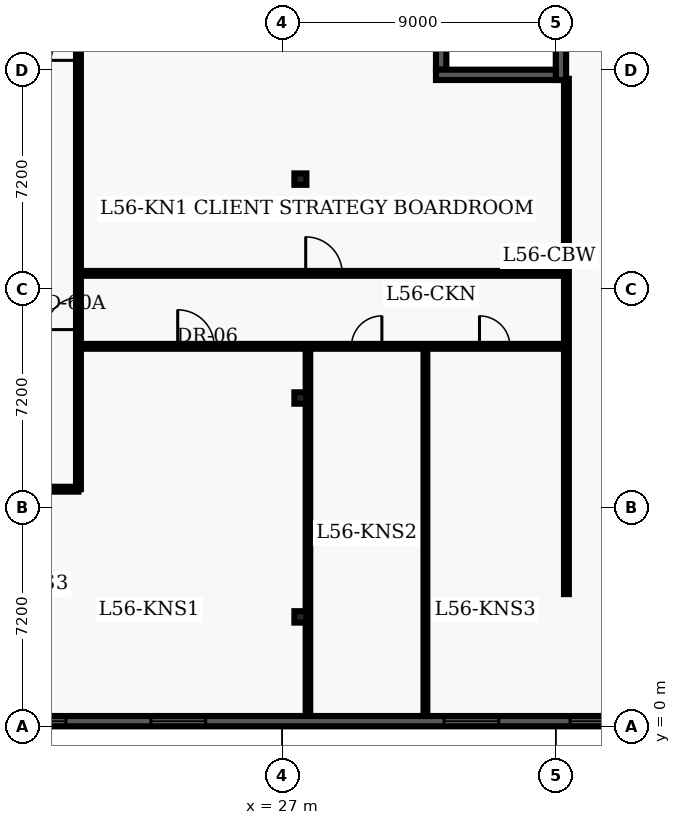
"""IFC4 building model, lengths in metres.
Left out: names, types, materials, properties, quantities, classifications, styles, units other than length and angle.
Written with IfcOpenShell. Run it as: python <this file> out.ifc"""

import sys

from ifc_helpers import new_model, entity, si_unit, converted_unit, direction, frame, origin_with_axes, origin_2d_with_axis, place, context, subcontext, project, spatial, polyline, rectangle, i_section, outline, extrude, element, fill, save


model = new_model("IFC4")
c1 = context("Model", 3, precision=1e-05, world=origin_with_axes(), true_north=direction((0.0, 1.0)))
c2 = subcontext(c1, "Body", "Model", "MODEL_VIEW")
j1 = project(units=[si_unit("LENGTHUNIT", "METRE"), converted_unit("PLANEANGLEUNIT", "DEGREE", entity("IfcPlaneAngleMeasure", 0.017), si_unit("PLANEANGLEUNIT", "RADIAN"), dimensions=[0, 0, 0, 0, 0, 0, 0])], contexts=[c1])
p1 = place(None, origin_with_axes())
s1 = spatial("IfcSite", under=j1, at=p1, CompositionType="ELEMENT")
p2 = place(p1, origin_with_axes())
s2 = spatial("IfcBuilding", under=s1, at=p2, CompositionType="ELEMENT")
p3 = place(p2, frame((0.0, 0.0, 228.6), z_axis=(0.0, 0.0, 1.0), x_axis=(1.0, 0.0, 0.0)))
s3 = spatial("IfcBuildingStorey", under=s2, at=p3, CompositionType="ELEMENT", Elevation=228.6)
for number, where, z_axis, x_axis in (
    (1, (27.6, 3.6, 0.0), (0.0, 0.0, 1.0), (1.0, 0.0, 0.0)),
    (2, (27.6, 10.8, 0.0), (0.0, 0.0, 1.0), (1.0, 0.0, 0.0)),
    (3, (27.6, 18.0, 0.0), (0.0, 0.0, 1.0), (1.0, 0.0, 0.0)),
):
    element("IfcColumn", number, at=place(p3, frame(where, z_axis=z_axis, x_axis=x_axis)), inside=s3, PredefinedType="COLUMN", context=c2, shape_type="SweptSolid", body=[
        extrude(i_section(OverallWidth=0.394, OverallDepth=0.375, WebThickness=0.017, FlangeThickness=0.028, FilletRadius=0.02, at=origin_2d_with_axis()), origin_with_axes(), (0.0, 0.0, 1.0), 3.9),
    ])
p4 = place(p3, frame((7.1, 7.8, 0.0), z_axis=(0.0, 0.0, 1.0), x_axis=(1.0, 0.0, 0.0)))
e4 = element("IfcWall", 4, at=p4, inside=s3, PredefinedType="PARTITIONING", context=c2, shape_type="SweptSolid", body=[
    extrude(outline(polyline([(0.0, -0.08), (13.2, -0.08), (13.2, 0.08), (0.0, 0.08), (0.0, -0.08)])), origin_with_axes(), (0.0, 0.0, 1.0), 2.7),
])
p5 = place(p4, frame((2.929, 0.0, 0.0), z_axis=(0.0, 0.0, 1.0), x_axis=(1.0, 0.0, 0.0)))
e5 = element("IfcOpeningElement", 5, at=p5, cuts=e4, PredefinedType="OPENING", context=c2, shape_type="SweptSolid", body=[
    extrude(rectangle(XDim=1.0, YDim=0.18, at=origin_2d_with_axis()), origin_with_axes(), (0.0, 0.0, 1.0), 2.15),
])
p6 = place(p4, frame((7.56, 0.0, 0.0), z_axis=(0.0, 0.0, 1.0), x_axis=(1.0, 0.0, 0.0)))
e6 = element("IfcOpeningElement", 6, at=p6, cuts=e4, PredefinedType="OPENING", context=c2, shape_type="SweptSolid", body=[
    extrude(rectangle(XDim=1.0, YDim=0.18, at=origin_2d_with_axis()), origin_with_axes(), (0.0, 0.0, 1.0), 2.15),
])
p7 = place(p4, frame((11.201, 0.0, 0.0), z_axis=(0.0, 0.0, 1.0), x_axis=(1.0, 0.0, 0.0)))
e7 = element("IfcOpeningElement", 7, at=p7, cuts=e4, PredefinedType="OPENING", context=c2, shape_type="SweptSolid", body=[
    extrude(rectangle(XDim=1.0, YDim=0.18, at=origin_2d_with_axis()), origin_with_axes(), (0.0, 0.0, 1.0), 2.15),
])
p8 = place(p3, frame((20.3, 7.8, 0.0), z_axis=(0.0, 0.0, 1.0), x_axis=(0.0, 1.0, 0.0)))
e8 = element("IfcWall", 8, at=p8, inside=s3, PredefinedType="PARTITIONING", context=c2, shape_type="SweptSolid", body=[
    extrude(outline(polyline([(0.0, -0.08), (32.7, -0.08), (32.7, 0.08), (0.0, 0.08), (0.0, -0.08)])), origin_with_axes(), (0.0, 0.0, 1.0), 2.7),
])
p9 = place(p8, frame((14.556, 0.0, 0.0), z_axis=(0.0, 0.0, 1.0), x_axis=(1.0, 0.0, 0.0)))
e9 = element("IfcOpeningElement", 9, at=p9, cuts=e8, PredefinedType="OPENING", context=c2, shape_type="SweptSolid", body=[
    extrude(rectangle(XDim=0.9, YDim=0.18, at=origin_2d_with_axis()), origin_with_axes(), (0.0, 0.0, 1.0), 2.15),
])
p10 = place(p8, frame((18.551, 0.0, 0.0), z_axis=(0.0, 0.0, 1.0), x_axis=(1.0, 0.0, 0.0)))
e10 = element("IfcOpeningElement", 10, at=p10, cuts=e8, PredefinedType="OPENING", context=c2, shape_type="SweptSolid", body=[
    extrude(rectangle(XDim=1.0, YDim=0.18, at=origin_2d_with_axis()), origin_with_axes(), (0.0, 0.0, 1.0), 2.15),
])
p11 = place(p8, frame((22.226, 0.0, 0.0), z_axis=(0.0, 0.0, 1.0), x_axis=(1.0, 0.0, 0.0)))
e11 = element("IfcOpeningElement", 11, at=p11, cuts=e8, PredefinedType="OPENING", context=c2, shape_type="SweptSolid", body=[
    extrude(rectangle(XDim=1.0, YDim=0.18, at=origin_2d_with_axis()), origin_with_axes(), (0.0, 0.0, 1.0), 2.15),
])
p12 = place(p8, frame((25.754, 0.0, 0.0), z_axis=(0.0, 0.0, 1.0), x_axis=(1.0, 0.0, 0.0)))
e12 = element("IfcOpeningElement", 12, at=p12, cuts=e8, PredefinedType="OPENING", context=c2, shape_type="SweptSolid", body=[
    extrude(rectangle(XDim=1.0, YDim=0.18, at=origin_2d_with_axis()), origin_with_axes(), (0.0, 0.0, 1.0), 2.15),
])
p13 = place(p8, frame((5.775, 0.0, 0.0), z_axis=(0.0, 0.0, 1.0), x_axis=(1.0, 0.0, 0.0)))
e13 = element("IfcOpeningElement", 13, at=p13, cuts=e8, PredefinedType="OPENING", context=c2, shape_type="SweptSolid", body=[
    extrude(rectangle(XDim=1.05, YDim=0.18, at=origin_2d_with_axis()), origin_with_axes(), (0.0, 0.0, 1.0), 2.15),
])
p14 = place(p3, frame((20.3, 12.5, 0.0), z_axis=(0.0, 0.0, 1.0), x_axis=(1.0, 0.0, 0.0)))
e14 = element("IfcWall", 14, at=p14, inside=s3, PredefinedType="PARTITIONING", context=c2, shape_type="SweptSolid", body=[
    extrude(outline(polyline([(0.0, -0.08), (16.05, -0.08), (16.05, 0.08), (0.0, 0.08), (0.0, -0.08)])), origin_with_axes(), (0.0, 0.0, 1.0), 2.7),
])
p15 = place(p14, frame((3.865, 0.0, 0.0), z_axis=(0.0, 0.0, 1.0), x_axis=(1.0, 0.0, 0.0)))
e15 = element("IfcOpeningElement", 15, at=p15, cuts=e14, PredefinedType="OPENING", context=c2, shape_type="SweptSolid", body=[
    extrude(rectangle(XDim=1.2, YDim=0.18, at=origin_2d_with_axis()), origin_with_axes(), (0.0, 0.0, 1.0), 2.2),
])
p16 = place(p14, frame((9.48, 0.0, 0.0), z_axis=(0.0, 0.0, 1.0), x_axis=(1.0, 0.0, 0.0)))
e16 = element("IfcOpeningElement", 16, at=p16, cuts=e14, PredefinedType="OPENING", context=c2, shape_type="SweptSolid", body=[
    extrude(rectangle(XDim=1.0, YDim=0.18, at=origin_2d_with_axis()), origin_with_axes(), (0.0, 0.0, 1.0), 2.15),
])
p17 = place(p14, frame((13.691, 0.0, 0.0), z_axis=(0.0, 0.0, 1.0), x_axis=(1.0, 0.0, 0.0)))
e17 = element("IfcOpeningElement", 17, at=p17, cuts=e14, PredefinedType="OPENING", context=c2, shape_type="SweptSolid", body=[
    extrude(rectangle(XDim=1.0, YDim=0.18, at=origin_2d_with_axis()), origin_with_axes(), (0.0, 0.0, 1.0), 2.15),
])
p18 = place(p3, frame((20.3, 14.9, 0.0), z_axis=(0.0, 0.0, 1.0), x_axis=(1.0, 0.0, 0.0)))
e18 = element("IfcWall", 18, at=p18, inside=s3, PredefinedType="PARTITIONING", context=c2, shape_type="SweptSolid", body=[
    extrude(outline(polyline([(0.0, -0.08), (16.05, -0.08), (16.05, 0.08), (0.0, 0.08), (0.0, -0.08)])), origin_with_axes(), (0.0, 0.0, 1.0), 2.7),
])
p19 = place(p18, frame((8.075, 0.0, 0.0), z_axis=(0.0, 0.0, 1.0), x_axis=(1.0, 0.0, 0.0)))
e19 = element("IfcOpeningElement", 19, at=p19, cuts=e18, PredefinedType="OPENING", context=c2, shape_type="SweptSolid", body=[
    extrude(rectangle(XDim=1.2, YDim=0.18, at=origin_2d_with_axis()), origin_with_axes(), (0.0, 0.0, 1.0), 2.2),
])
p20 = place(p3, frame((36.35, 4.35, 0.0), z_axis=(0.0, 0.0, 1.0), x_axis=(0.0, 1.0, 0.0)))
e20 = element("IfcWall", 20, at=p20, inside=s3, PredefinedType="PARTITIONING", context=c2, shape_type="SweptSolid", body=[
    extrude(outline(polyline([(0.0, -0.08), (16.95, -0.08), (16.95, 0.08), (0.0, 0.08), (0.0, -0.08)])), origin_with_axes(), (0.0, 0.0, 1.0), 2.7),
])
p21 = place(p3, frame((27.849, 0.335, 0.0), z_axis=(0.0, 0.0, 1.0), x_axis=(0.0, 1.0, 0.0)))
e21 = element("IfcWall", 21, at=p21, inside=s3, PredefinedType="PARTITIONING", context=c2, shape_type="SweptSolid", body=[
    extrude(outline(polyline([(0.0, -0.075), (12.045, -0.075), (12.045, 0.075), (0.0, 0.075), (0.0, -0.075)])), origin_with_axes(), (0.0, 0.0, 1.0), 2.7),
])
p22 = place(p3, frame((31.712, 0.335, 0.0), z_axis=(0.0, 0.0, 1.0), x_axis=(0.0, 1.0, 0.0)))
e22 = element("IfcWall", 22, at=p22, inside=s3, PredefinedType="PARTITIONING", context=c2, shape_type="SweptSolid", body=[
    extrude(outline(polyline([(0.0, -0.062), (12.045, -0.062), (12.045, 0.062), (0.0, 0.062), (0.0, -0.062)])), origin_with_axes(), (0.0, 0.0, 1.0), 2.7),
])
p23 = place(p3, frame((36.17, 21.26, 0.0), z_axis=(0.0, 0.0, 1.0), x_axis=(0.0, 1.0, 0.0)))
e23 = element("IfcWall", 23, at=p23, inside=s3, PredefinedType="SOLIDWALL", context=c2, shape_type="SweptSolid", body=[
    extrude(outline(polyline([(0.0, -0.17), (7.54, -0.17), (7.54, 0.17), (0.0, 0.17), (0.0, -0.17)])), origin_with_axes(), (0.0, 0.0, 1.0), 3.66),
])
p24 = place(p23, frame((3.77, 0.0, 0.45), z_axis=(0.0, 0.0, 1.0), x_axis=(1.0, 0.0, 0.0)))
e24 = element("IfcOpeningElement", 24, at=p24, cuts=e23, PredefinedType="OPENING", context=c2, shape_type="SweptSolid", body=[
    extrude(rectangle(XDim=1.8, YDim=0.36, at=origin_2d_with_axis()), origin_with_axes(), (0.0, 0.0, 1.0), 2.1),
])
p25 = place(p3, frame((49.46, 0.17, 0.0), z_axis=(0.0, 0.0, 1.0), x_axis=(-1.0, 0.0, 0.0)))
e25 = element("IfcWall", 25, at=p25, inside=s3, PredefinedType="SOLIDWALL", context=c2, shape_type="SweptSolid", body=[
    extrude(outline(polyline([(0.0, -0.17), (42.56, -0.17), (42.56, 0.17), (0.0, 0.17), (0.0, -0.17)])), origin_with_axes(), (0.0, 0.0, 1.0), 3.66),
])
p26 = place(p25, frame((2.898, 0.0, 0.45), z_axis=(0.0, 0.0, 1.0), x_axis=(1.0, 0.0, 0.0)))
e26 = element("IfcOpeningElement", 26, at=p26, cuts=e25, PredefinedType="OPENING", context=c2, shape_type="SweptSolid", body=[
    extrude(rectangle(XDim=1.8, YDim=0.36, at=origin_2d_with_axis()), origin_with_axes(), (0.0, 0.0, 1.0), 2.1),
])
p27 = place(p25, frame((7.493, 0.0, 0.45), z_axis=(0.0, 0.0, 1.0), x_axis=(1.0, 0.0, 0.0)))
e27 = element("IfcOpeningElement", 27, at=p27, cuts=e25, PredefinedType="OPENING", context=c2, shape_type="SweptSolid", body=[
    extrude(rectangle(XDim=1.8, YDim=0.36, at=origin_2d_with_axis()), origin_with_axes(), (0.0, 0.0, 1.0), 2.1),
])
p28 = place(p25, frame((12.089, 0.0, 0.45), z_axis=(0.0, 0.0, 1.0), x_axis=(1.0, 0.0, 0.0)))
e28 = element("IfcOpeningElement", 28, at=p28, cuts=e25, PredefinedType="OPENING", context=c2, shape_type="SweptSolid", body=[
    extrude(rectangle(XDim=1.8, YDim=0.36, at=origin_2d_with_axis()), origin_with_axes(), (0.0, 0.0, 1.0), 2.1),
])
p29 = place(p25, frame((16.234, 0.0, 0.45), z_axis=(0.0, 0.0, 1.0), x_axis=(1.0, 0.0, 0.0)))
e29 = element("IfcOpeningElement", 29, at=p29, cuts=e25, PredefinedType="OPENING", context=c2, shape_type="SweptSolid", body=[
    extrude(rectangle(XDim=1.8, YDim=0.36, at=origin_2d_with_axis()), origin_with_axes(), (0.0, 0.0, 1.0), 2.1),
])
p30 = place(p25, frame((25.876, 0.0, 0.45), z_axis=(0.0, 0.0, 1.0), x_axis=(1.0, 0.0, 0.0)))
e30 = element("IfcOpeningElement", 30, at=p30, cuts=e25, PredefinedType="OPENING", context=c2, shape_type="SweptSolid", body=[
    extrude(rectangle(XDim=1.8, YDim=0.36, at=origin_2d_with_axis()), origin_with_axes(), (0.0, 0.0, 1.0), 2.1),
])
p31 = place(p25, frame((30.471, 0.0, 0.45), z_axis=(0.0, 0.0, 1.0), x_axis=(1.0, 0.0, 0.0)))
e31 = element("IfcOpeningElement", 31, at=p31, cuts=e25, PredefinedType="OPENING", context=c2, shape_type="SweptSolid", body=[
    extrude(rectangle(XDim=1.8, YDim=0.36, at=origin_2d_with_axis()), origin_with_axes(), (0.0, 0.0, 1.0), 2.1),
])
p32 = place(p25, frame((35.067, 0.0, 0.45), z_axis=(0.0, 0.0, 1.0), x_axis=(1.0, 0.0, 0.0)))
e32 = element("IfcOpeningElement", 32, at=p32, cuts=e25, PredefinedType="OPENING", context=c2, shape_type="SweptSolid", body=[
    extrude(rectangle(XDim=1.8, YDim=0.36, at=origin_2d_with_axis()), origin_with_axes(), (0.0, 0.0, 1.0), 2.1),
])
p33 = place(p25, frame((39.662, 0.0, 0.45), z_axis=(0.0, 0.0, 1.0), x_axis=(1.0, 0.0, 0.0)))
e33 = element("IfcOpeningElement", 33, at=p33, cuts=e25, PredefinedType="OPENING", context=c2, shape_type="SweptSolid", body=[
    extrude(rectangle(XDim=1.8, YDim=0.36, at=origin_2d_with_axis()), origin_with_axes(), (0.0, 0.0, 1.0), 2.1),
])
p34 = place(p3, frame((32.23, 41.82, 0.0), z_axis=(0.0, 0.0, 1.0), x_axis=(0.0, -1.0, 0.0)))
e34 = element("IfcWall", 34, at=p34, inside=s3, PredefinedType="SOLIDWALL", context=c2, shape_type="SweptSolid", body=[
    extrude(outline(polyline([(0.0, -0.17), (20.22, -0.17), (20.22, 0.17), (0.0, 0.17), (0.0, -0.17)])), origin_with_axes(), (0.0, 0.0, 1.0), 3.66),
])
p35 = place(p34, frame((2.978, 0.0, 0.45), z_axis=(0.0, 0.0, 1.0), x_axis=(1.0, 0.0, 0.0)))
e35 = element("IfcOpeningElement", 35, at=p35, cuts=e34, PredefinedType="OPENING", context=c2, shape_type="SweptSolid", body=[
    extrude(rectangle(XDim=1.8, YDim=0.36, at=origin_2d_with_axis()), origin_with_axes(), (0.0, 0.0, 1.0), 2.1),
])
p36 = place(p34, frame((7.732, 0.0, 0.45), z_axis=(0.0, 0.0, 1.0), x_axis=(1.0, 0.0, 0.0)))
e36 = element("IfcOpeningElement", 36, at=p36, cuts=e34, PredefinedType="OPENING", context=c2, shape_type="SweptSolid", body=[
    extrude(rectangle(XDim=1.8, YDim=0.36, at=origin_2d_with_axis()), origin_with_axes(), (0.0, 0.0, 1.0), 2.1),
])
p37 = place(p34, frame((12.037, 0.0, 0.45), z_axis=(0.0, 0.0, 1.0), x_axis=(1.0, 0.0, 0.0)))
e37 = element("IfcOpeningElement", 37, at=p37, cuts=e34, PredefinedType="OPENING", context=c2, shape_type="SweptSolid", body=[
    extrude(rectangle(XDim=1.8, YDim=0.36, at=origin_2d_with_axis()), origin_with_axes(), (0.0, 0.0, 1.0), 2.1),
])
p38 = place(p3, frame((32.06, 21.43, 0.0), z_axis=(0.0, 0.0, 1.0), x_axis=(1.0, 0.0, 0.0)))
e38 = element("IfcWall", 38, at=p38, inside=s3, PredefinedType="SOLIDWALL", context=c2, shape_type="SweptSolid", body=[
    extrude(outline(polyline([(0.0, -0.17), (3.94, -0.17), (3.94, 0.17), (0.0, 0.17), (0.0, -0.17)])), origin_with_axes(), (0.0, 0.0, 1.0), 3.66),
])
p39 = place(p8, frame((14.556, 0.0, 0.0), z_axis=(0.0, 0.0, 1.0), x_axis=(1.0, 0.0, 0.0)))
e39 = element("IfcDoor", 39, at=p39, inside=s3, OperationType="SINGLE_SWING_LEFT", PredefinedType="DOOR", context=c2, shape_type="SweptSolid", body=[
    extrude(rectangle(XDim=0.9, YDim=0.09, at=origin_2d_with_axis()), origin_with_axes(), (0.0, 0.0, 1.0), 2.15),
])
fill(e9, e39)
p40 = place(p8, frame((5.775, 0.0, 0.0), z_axis=(0.0, 0.0, 1.0), x_axis=(1.0, 0.0, 0.0)))
e40 = element("IfcDoor", 40, at=p40, inside=s3, OperationType="SINGLE_SWING_LEFT", PredefinedType="DOOR", context=c2, shape_type="SweptSolid", body=[
    extrude(rectangle(XDim=1.05, YDim=0.09, at=origin_2d_with_axis()), origin_with_axes(), (0.0, 0.0, 1.0), 2.15),
])
fill(e13, e40)
p41 = place(p14, frame((3.865, 0.0, 0.0), z_axis=(0.0, 0.0, 1.0), x_axis=(1.0, 0.0, 0.0)))
e41 = element("IfcDoor", 41, at=p41, inside=s3, OperationType="SINGLE_SWING_LEFT", PredefinedType="DOOR", context=c2, shape_type="SweptSolid", body=[
    extrude(rectangle(XDim=1.2, YDim=0.09, at=origin_2d_with_axis()), origin_with_axes(), (0.0, 0.0, 1.0), 2.2),
])
fill(e15, e41)
p42 = place(p14, frame((9.48, 0.0, 0.0), z_axis=(0.0, 0.0, 1.0), x_axis=(1.0, 0.0, 0.0)))
e42 = element("IfcDoor", 42, at=p42, inside=s3, OperationType="SINGLE_SWING_RIGHT", PredefinedType="DOOR", context=c2, shape_type="SweptSolid", body=[
    extrude(rectangle(XDim=1.0, YDim=0.09, at=origin_2d_with_axis()), origin_with_axes(), (0.0, 0.0, 1.0), 2.15),
])
fill(e16, e42)
p43 = place(p14, frame((13.691, 0.0, 0.0), z_axis=(0.0, 0.0, 1.0), x_axis=(1.0, 0.0, 0.0)))
e43 = element("IfcDoor", 43, at=p43, inside=s3, OperationType="SINGLE_SWING_LEFT", PredefinedType="DOOR", context=c2, shape_type="SweptSolid", body=[
    extrude(rectangle(XDim=1.0, YDim=0.09, at=origin_2d_with_axis()), origin_with_axes(), (0.0, 0.0, 1.0), 2.15),
])
fill(e17, e43)
p44 = place(p18, frame((8.075, 0.0, 0.0), z_axis=(0.0, 0.0, 1.0), x_axis=(1.0, 0.0, 0.0)))
e44 = element("IfcDoor", 44, at=p44, inside=s3, OperationType="SINGLE_SWING_LEFT", PredefinedType="DOOR", context=c2, shape_type="SweptSolid", body=[
    extrude(rectangle(XDim=1.2, YDim=0.09, at=origin_2d_with_axis()), origin_with_axes(), (0.0, 0.0, 1.0), 2.2),
])
fill(e19, e44)
p45 = place(p25, frame((12.089, 0.0, 0.45), z_axis=(0.0, 0.0, 1.0), x_axis=(1.0, 0.0, 0.0)))
e45 = element("IfcWindow", 45, at=p45, inside=s3, PredefinedType="WINDOW", context=c2, shape_type="SweptSolid", body=[
    extrude(rectangle(XDim=1.8, YDim=0.09, at=origin_2d_with_axis()), origin_with_axes(), (0.0, 0.0, 1.0), 2.1),
])
fill(e28, e45)
p46 = place(p25, frame((16.234, 0.0, 0.45), z_axis=(0.0, 0.0, 1.0), x_axis=(1.0, 0.0, 0.0)))
e46 = element("IfcWindow", 46, at=p46, inside=s3, PredefinedType="WINDOW", context=c2, shape_type="SweptSolid", body=[
    extrude(rectangle(XDim=1.8, YDim=0.09, at=origin_2d_with_axis()), origin_with_axes(), (0.0, 0.0, 1.0), 2.1),
])
fill(e29, e46)
p47 = place(p25, frame((25.876, 0.0, 0.45), z_axis=(0.0, 0.0, 1.0), x_axis=(1.0, 0.0, 0.0)))
e47 = element("IfcWindow", 47, at=p47, inside=s3, PredefinedType="WINDOW", context=c2, shape_type="SweptSolid", body=[
    extrude(rectangle(XDim=1.8, YDim=0.09, at=origin_2d_with_axis()), origin_with_axes(), (0.0, 0.0, 1.0), 2.1),
])
fill(e30, e47)
p48 = place(p25, frame((30.471, 0.0, 0.45), z_axis=(0.0, 0.0, 1.0), x_axis=(1.0, 0.0, 0.0)))
e48 = element("IfcWindow", 48, at=p48, inside=s3, PredefinedType="WINDOW", context=c2, shape_type="SweptSolid", body=[
    extrude(rectangle(XDim=1.8, YDim=0.09, at=origin_2d_with_axis()), origin_with_axes(), (0.0, 0.0, 1.0), 2.1),
])
fill(e31, e48)
save(model, sys.argv[1])
